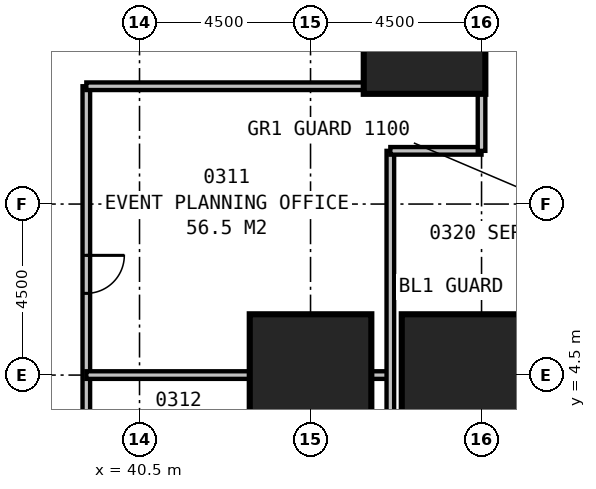
"""IFC4 building model, lengths in metres.
Left out: names, types, materials, properties, quantities, classifications, styles, units other than length and angle.
Written with IfcOpenShell. Run it as: python <this file> out.ifc"""

import sys

from ifc_helpers import new_model, si_unit, direction, frame, frame_2d, origin, origin_2d, place, context, subcontext, project, spatial, rectangle, extrude, element, fill, save


model = new_model("IFC4")
c1 = context("Model", 3, precision=1e-05, world=origin(), true_north=direction((0.0, 1.0)))
c2 = subcontext(c1, "Body", "Model", "MODEL_VIEW")
j1 = project(units=[si_unit("LENGTHUNIT", "METRE"), si_unit("PLANEANGLEUNIT", "RADIAN")], contexts=[c1])
p1 = place(None, origin())
s1 = spatial("IfcSite", under=j1, at=p1, CompositionType="ELEMENT")
p2 = place(p1, origin())
s2 = spatial("IfcBuilding", under=s1, at=p2, CompositionType="ELEMENT")
p3 = place(p2, frame((0.0, 0.0, 19.0)))
s3 = spatial("IfcBuildingStorey", under=s2, at=p3, CompositionType="ELEMENT", Elevation=19.0)
for number, where, z_axis, x_axis in (
    (1, (45.0, 4.5, 0.0), (0.0, 0.0, 1.0), (1.0, 0.0, 0.0)),
    (2, (49.0, 4.5, 0.0), (0.0, 0.0, 1.0), (1.0, 0.0, 0.0)),
    (3, (48.0, 13.5, 0.0), (0.0, 0.0, 1.0), (1.0, 0.0, 0.0)),
):
    element("IfcColumn", number, at=place(p3, frame(where, z_axis=z_axis, x_axis=x_axis)), inside=s3, PredefinedType="COLUMN", context=c2, shape_type="SweptSolid", body=[
        extrude(rectangle(XDim=3.2, YDim=3.2, at=origin_2d()), origin(), (0.0, 0.0, 1.0), 5.0),
    ])
p4 = place(p3, frame((47.1, 0.0, 0.0), z_axis=(0.0, 0.0, 1.0), x_axis=(0.0, 1.0, 0.0)))
e4 = element("IfcWall", 4, at=p4, inside=s3, PredefinedType="PARTITIONING", context=c2, shape_type="SweptSolid", body=[
    extrude(rectangle(XDim=10.4, YDim=0.2, at=frame_2d((5.2, 0.0))), origin(), (0.0, 0.0, 1.0), 4.7),
])
p5 = place(p3, frame((47.1, 10.4, 0.0), z_axis=(0.0, 0.0, 1.0), x_axis=(1.0, 0.0, 0.0)))
e5 = element("IfcWall", 5, at=p5, inside=s3, PredefinedType="PARTITIONING", context=c2, shape_type="SweptSolid", body=[
    extrude(rectangle(XDim=2.4, YDim=0.2, at=frame_2d((1.2, 0.0))), origin(), (0.0, 0.0, 1.0), 4.7),
])
p6 = place(p3, frame((49.5, 10.4, 0.0), z_axis=(0.0, 0.0, 1.0), x_axis=(0.0, 1.0, 0.0)))
e6 = element("IfcWall", 6, at=p6, inside=s3, PredefinedType="PARTITIONING", context=c2, shape_type="SweptSolid", body=[
    extrude(rectangle(XDim=30.1, YDim=0.2, at=frame_2d((15.05, 0.0))), origin(), (0.0, 0.0, 1.0), 4.7),
])
p7 = place(p6, frame((27.1, 0.0, 0.0)))
e7 = element("IfcOpeningElement", 7, at=p7, cuts=e6, PredefinedType="OPENING", context=c2, shape_type="SweptSolid", body=[
    extrude(rectangle(XDim=1.0, YDim=2.1, at=frame_2d((0.5, 1.05))), frame((0.0, 0.11, 0.0), z_axis=(0.0, -1.0, 0.0), x_axis=(1.0, 0.0, 0.0)), (0.0, 0.0, 1.0), 0.22),
])
p8 = place(p6, frame((4.8, 0.0, 0.0)))
e8 = element("IfcOpeningElement", 8, at=p8, cuts=e6, PredefinedType="OPENING", context=c2, shape_type="SweptSolid", body=[
    extrude(rectangle(XDim=1.2, YDim=2.1, at=frame_2d((0.6, 1.05))), frame((0.0, 0.11, 0.0), z_axis=(0.0, -1.0, 0.0), x_axis=(1.0, 0.0, 0.0)), (0.0, 0.0, 1.0), 0.22),
])
p9 = place(p3, frame((39.1, 0.0, 0.0), z_axis=(0.0, 0.0, 1.0), x_axis=(0.0, 1.0, 0.0)))
e9 = element("IfcWall", 9, at=p9, inside=s3, PredefinedType="PARTITIONING", context=c2, shape_type="SweptSolid", body=[
    extrude(rectangle(XDim=12.1, YDim=0.2, at=frame_2d((6.05, 0.0))), origin(), (0.0, 0.0, 1.0), 4.7),
])
p10 = place(p9, frame((7.65, 0.0, 0.0), z_axis=(0.0, 0.0, 1.0), x_axis=(-1.0, 0.0, 0.0)))
e10 = element("IfcOpeningElement", 10, at=p10, cuts=e9, PredefinedType="OPENING", context=c2, shape_type="SweptSolid", body=[
    extrude(rectangle(XDim=1.0, YDim=2.1, at=frame_2d((0.5, 1.05))), frame((0.0, 0.11, 0.0), z_axis=(0.0, -1.0, 0.0), x_axis=(1.0, 0.0, 0.0)), (0.0, 0.0, 1.0), 0.22),
])
p11 = place(p9, frame((2.65, 0.0, 0.0), z_axis=(0.0, 0.0, 1.0), x_axis=(-1.0, 0.0, 0.0)))
e11 = element("IfcOpeningElement", 11, at=p11, cuts=e9, PredefinedType="OPENING", context=c2, shape_type="SweptSolid", body=[
    extrude(rectangle(XDim=1.0, YDim=2.1, at=frame_2d((0.5, 1.05))), frame((0.0, 0.11, 0.0), z_axis=(0.0, -1.0, 0.0), x_axis=(1.0, 0.0, 0.0)), (0.0, 0.0, 1.0), 0.22),
])
p12 = place(p3, frame((39.1, 12.1, 0.0), z_axis=(0.0, 0.0, 1.0), x_axis=(1.0, 0.0, 0.0)))
e12 = element("IfcWall", 12, at=p12, inside=s3, PredefinedType="PARTITIONING", context=c2, shape_type="SweptSolid", body=[
    extrude(rectangle(XDim=10.4, YDim=0.2, at=frame_2d((5.2, 0.0))), origin(), (0.0, 0.0, 1.0), 4.7),
])
p13 = place(p3, frame((39.1, 4.5, 0.0), z_axis=(0.0, 0.0, 1.0), x_axis=(1.0, 0.0, 0.0)))
e13 = element("IfcWall", 13, at=p13, inside=s3, PredefinedType="PARTITIONING", context=c2, shape_type="SweptSolid", body=[
    extrude(rectangle(XDim=4.3, YDim=0.2, at=frame_2d((2.15, 0.0))), origin(), (0.0, 0.0, 1.0), 4.7),
])
p14 = place(p3, frame((46.6, 4.5, 0.0), z_axis=(0.0, 0.0, 1.0), x_axis=(1.0, 0.0, 0.0)))
e14 = element("IfcWall", 14, at=p14, inside=s3, PredefinedType="PARTITIONING", context=c2, shape_type="SweptSolid", body=[
    extrude(rectangle(XDim=0.5, YDim=0.2, at=frame_2d((0.25, 0.0))), origin(), (0.0, 0.0, 1.0), 3.4),
])
p15 = place(p10, origin())
e15 = element("IfcDoor", 15, at=p15, inside=s3, OperationType="SINGLE_SWING_LEFT", PredefinedType="DOOR", context=c2, shape_type="SweptSolid", body=[
    extrude(rectangle(XDim=1.0, YDim=2.1, at=frame_2d((0.5, 1.05))), frame((0.0, 0.025, 0.0), z_axis=(0.0, -1.0, 0.0), x_axis=(1.0, 0.0, 0.0)), (0.0, 0.0, 1.0), 0.05),
])
fill(e10, e15)
save(model, sys.argv[1])
